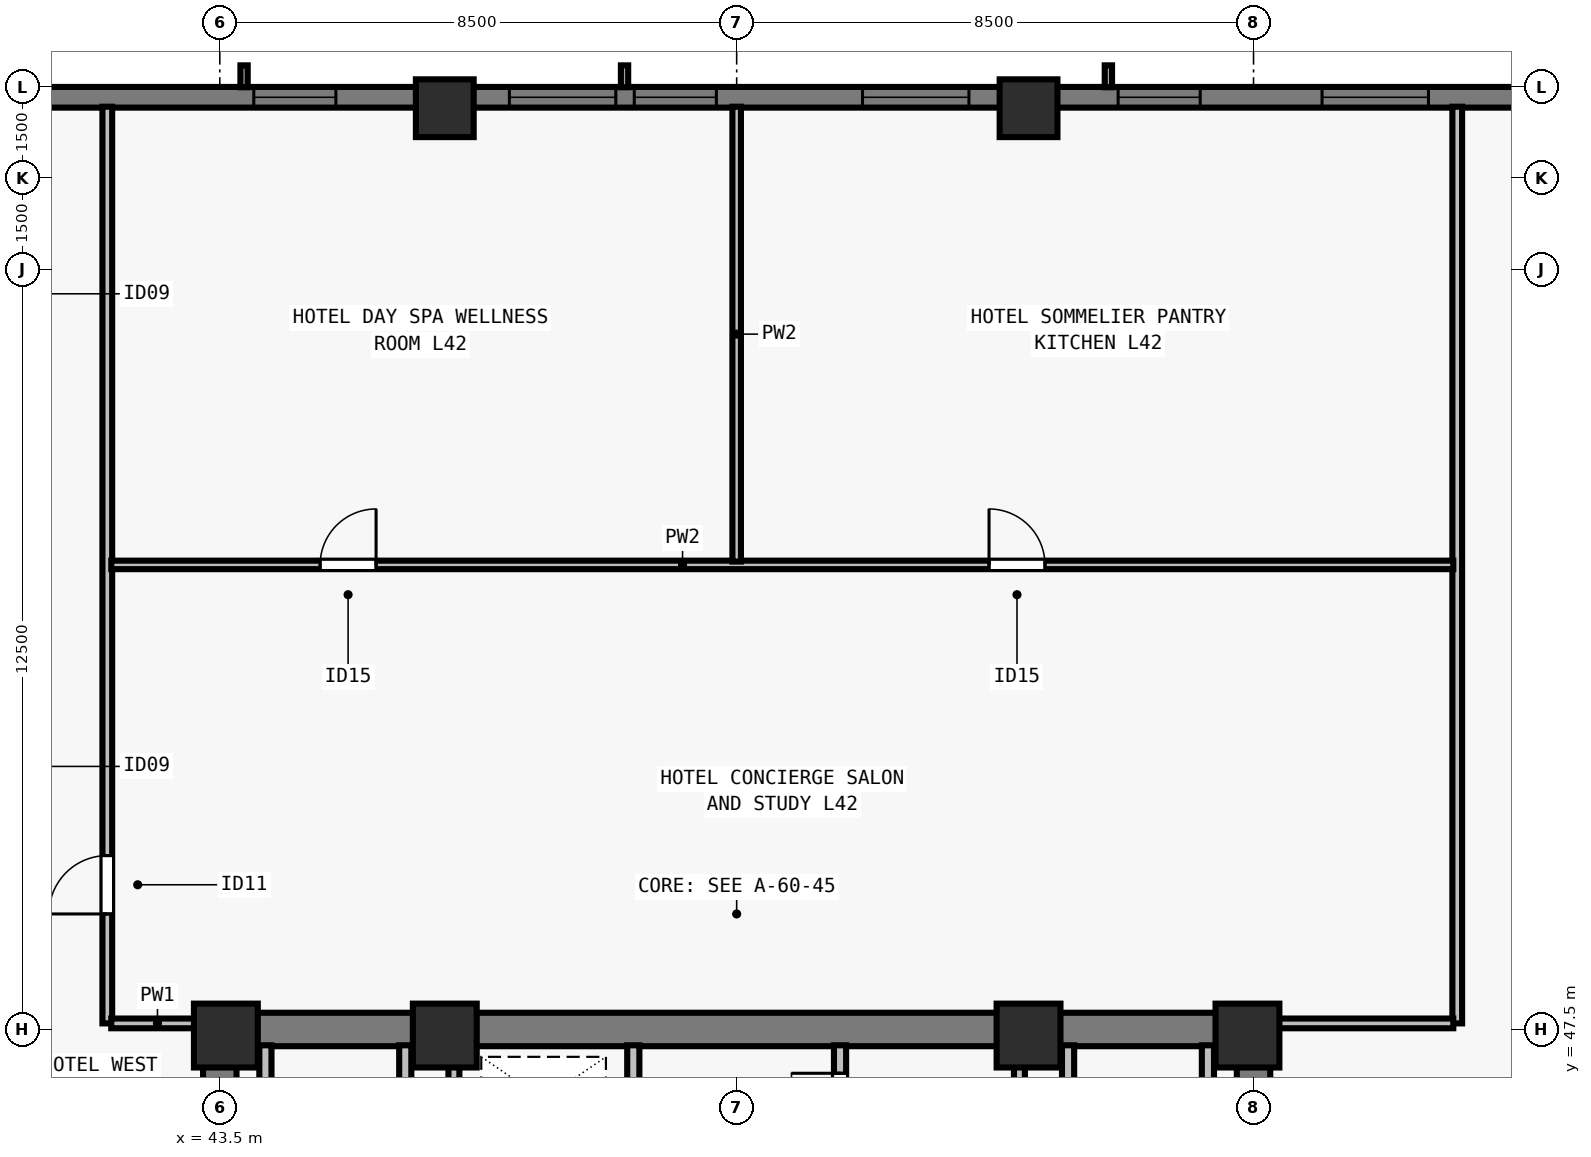
"""IFC4 building model, lengths in metres.
Left out: names, types, materials, properties, quantities, classifications, styles, units other than length and angle.
Written with IfcOpenShell. Run it as: python <this file> out.ifc"""

import sys

from ifc_helpers import new_model, si_unit, direction, frame, frame_2d, origin, origin_2d, place, context, subcontext, project, spatial, rectangle, extrude, element, fill, save


model = new_model("IFC4")
c1 = context("Model", 3, precision=1e-05, world=origin(), true_north=direction((0.0, 1.0)))
c2 = subcontext(c1, "Body", "Model", "MODEL_VIEW")
j1 = project(units=[si_unit("LENGTHUNIT", "METRE"), si_unit("PLANEANGLEUNIT", "RADIAN")], contexts=[c1])
p1 = place(None, origin())
s1 = spatial("IfcSite", under=j1, at=p1, CompositionType="ELEMENT")
p2 = place(p1, origin())
s2 = spatial("IfcBuilding", under=s1, at=p2, CompositionType="ELEMENT")
p3 = place(p2, frame((0.0, 0.0, 155.0)))
s3 = spatial("IfcBuildingStorey", under=s2, at=p3, CompositionType="ELEMENT", Elevation=155.0)
for number, where, z_axis, x_axis in (
    (1, (43.6, 47.4, 0.0), (0.0, 0.0, 1.0), (1.0, 0.0, 0.0)),
    (2, (47.2, 47.4, 0.0), (0.0, 0.0, 1.0), (1.0, 0.0, 0.0)),
    (3, (56.8, 47.4, 0.0), (0.0, 0.0, 1.0), (1.0, 0.0, 0.0)),
    (4, (60.4, 47.4, 0.0), (0.0, 0.0, 1.0), (1.0, 0.0, 0.0)),
):
    element("IfcColumn", number, at=place(p3, frame(where, z_axis=z_axis, x_axis=x_axis)), inside=s3, PredefinedType="COLUMN", context=c2, shape_type="SweptSolid", body=[
        extrude(rectangle(XDim=1.05, YDim=1.05, at=origin_2d()), origin(), (0.0, 0.0, 1.0), 3.5),
    ])
for number, where, z_axis, x_axis in (
    (5, (56.8, 62.65, 0.0), (0.0, 0.0, 1.0), (1.0, 0.0, 0.0)),
    (6, (47.2, 62.65, 0.0), (0.0, 0.0, 1.0), (1.0, 0.0, 0.0)),
):
    element("IfcColumn", number, at=place(p3, frame(where, z_axis=z_axis, x_axis=x_axis)), inside=s3, PredefinedType="COLUMN", context=c2, shape_type="SweptSolid", body=[
        extrude(rectangle(XDim=0.95, YDim=0.95, at=origin_2d()), origin(), (0.0, 0.0, 1.0), 3.5),
    ])
p4 = place(p3, frame((32.0, 62.83, 0.0), z_axis=(0.0, 0.0, 1.0), x_axis=(1.0, 0.0, 0.0)))
e7 = element("IfcWall", 7, at=p4, inside=s3, PredefinedType="SOLIDWALL", context=c2, shape_type="SweptSolid", body=[
    extrude(rectangle(XDim=39.682, YDim=0.34, at=frame_2d((19.841, 0.0))), origin(), (0.0, 0.0, 1.0), 3.28),
])
p5 = place(p4, frame((4.952, 0.0, 0.8)))
e8 = element("IfcOpeningElement", 8, at=p5, cuts=e7, PredefinedType="OPENING", context=c2, shape_type="SweptSolid", body=[
    extrude(rectangle(XDim=1.35, YDim=1.66, at=frame_2d((0.675, 0.83))), frame((0.0, 0.18, 0.0), z_axis=(0.0, -1.0, 0.0), x_axis=(1.0, 0.0, 0.0)), (0.0, 0.0, 1.0), 0.36),
])
p6 = place(p4, frame((12.059, 0.0, 0.8)))
e9 = element("IfcOpeningElement", 9, at=p6, cuts=e7, PredefinedType="OPENING", context=c2, shape_type="SweptSolid", body=[
    extrude(rectangle(XDim=1.35, YDim=1.66, at=frame_2d((0.675, 0.83))), frame((0.0, 0.18, 0.0), z_axis=(0.0, -1.0, 0.0), x_axis=(1.0, 0.0, 0.0)), (0.0, 0.0, 1.0), 0.36),
])
p7 = place(p4, frame((16.262, 0.0, 0.8)))
e10 = element("IfcOpeningElement", 10, at=p7, cuts=e7, PredefinedType="OPENING", context=c2, shape_type="SweptSolid", body=[
    extrude(rectangle(XDim=1.75, YDim=1.66, at=frame_2d((0.875, 0.83))), frame((0.0, 0.18, 0.0), z_axis=(0.0, -1.0, 0.0), x_axis=(1.0, 0.0, 0.0)), (0.0, 0.0, 1.0), 0.36),
])
p8 = place(p4, frame((18.316, 0.0, 0.8)))
e11 = element("IfcOpeningElement", 11, at=p8, cuts=e7, PredefinedType="OPENING", context=c2, shape_type="SweptSolid", body=[
    extrude(rectangle(XDim=1.35, YDim=1.66, at=frame_2d((0.675, 0.83))), frame((0.0, 0.18, 0.0), z_axis=(0.0, -1.0, 0.0), x_axis=(1.0, 0.0, 0.0)), (0.0, 0.0, 1.0), 0.36),
])
p9 = place(p4, frame((22.07, 0.0, 0.8)))
e12 = element("IfcOpeningElement", 12, at=p9, cuts=e7, PredefinedType="OPENING", context=c2, shape_type="SweptSolid", body=[
    extrude(rectangle(XDim=1.75, YDim=1.66, at=frame_2d((0.875, 0.83))), frame((0.0, 0.18, 0.0), z_axis=(0.0, -1.0, 0.0), x_axis=(1.0, 0.0, 0.0)), (0.0, 0.0, 1.0), 0.36),
])
p10 = place(p4, frame((26.273, 0.0, 0.8)))
e13 = element("IfcOpeningElement", 13, at=p10, cuts=e7, PredefinedType="OPENING", context=c2, shape_type="SweptSolid", body=[
    extrude(rectangle(XDim=1.35, YDim=1.66, at=frame_2d((0.675, 0.83))), frame((0.0, 0.18, 0.0), z_axis=(0.0, -1.0, 0.0), x_axis=(1.0, 0.0, 0.0)), (0.0, 0.0, 1.0), 0.36),
])
p11 = place(p4, frame((29.627, 0.0, 0.8)))
e14 = element("IfcOpeningElement", 14, at=p11, cuts=e7, PredefinedType="OPENING", context=c2, shape_type="SweptSolid", body=[
    extrude(rectangle(XDim=1.75, YDim=1.66, at=frame_2d((0.875, 0.83))), frame((0.0, 0.18, 0.0), z_axis=(0.0, -1.0, 0.0), x_axis=(1.0, 0.0, 0.0)), (0.0, 0.0, 1.0), 0.36),
])
p12 = place(p3, frame((43.225, 47.5, 0.0), z_axis=(0.0, 0.0, 1.0), x_axis=(1.0, 0.0, 0.0)))
e15 = element("IfcWall", 15, at=p12, inside=s3, PredefinedType="SHEAR", context=c2, shape_type="SweptSolid", body=[
    extrude(rectangle(XDim=17.55, YDim=0.55, at=frame_2d((8.775, 0.0))), origin(), (0.0, 0.0, 1.0), 3.28),
])
for number, where, z_axis, x_axis in (
    (16, (43.5, 40.8, 0.0), (0.0, 0.0, 1.0), (0.0, 1.0, 0.0)),
    (17, (60.5, 40.8, 0.0), (0.0, 0.0, 1.0), (0.0, 1.0, 0.0)),
):
    element("IfcWall", number, at=place(p3, frame(where, z_axis=z_axis, x_axis=x_axis)), inside=s3, PredefinedType="SHEAR", context=c2, shape_type="SweptSolid", body=[
        extrude(rectangle(XDim=6.435, YDim=0.55, at=frame_2d((3.218, 0.0))), origin(), (0.0, 0.0, 1.0), 3.28),
    ])
p13 = place(p3, frame((50.3, 40.585, 0.0), z_axis=(0.0, 0.0, 1.0), x_axis=(0.0, 1.0, 0.0)))
e18 = element("IfcWall", 18, at=p13, inside=s3, PredefinedType="SOLIDWALL", context=c2, shape_type="SweptSolid", body=[
    extrude(rectangle(XDim=6.655, YDim=0.2, at=frame_2d((3.328, 0.0))), origin(), (0.0, 0.0, 1.0), 3.28),
])
p14 = place(p13, frame((5.065, 0.0, 0.0)))
e19 = element("IfcOpeningElement", 19, at=p14, cuts=e18, PredefinedType="OPENING", context=c2, shape_type="SweptSolid", body=[
    extrude(rectangle(XDim=0.8, YDim=2.08, at=frame_2d((0.4, 1.04))), frame((0.0, 0.11, 0.0), z_axis=(0.0, -1.0, 0.0), x_axis=(1.0, 0.0, 0.0)), (0.0, 0.0, 1.0), 0.22),
])
p15 = place(p3, frame((53.7, 40.585, 0.0), z_axis=(0.0, 0.0, 1.0), x_axis=(0.0, 1.0, 0.0)))
e20 = element("IfcWall", 20, at=p15, inside=s3, PredefinedType="SOLIDWALL", context=c2, shape_type="SweptSolid", body=[
    extrude(rectangle(XDim=6.655, YDim=0.2, at=frame_2d((3.328, 0.0))), origin(), (0.0, 0.0, 1.0), 3.28),
])
p16 = place(p15, frame((0.195, 0.0, 0.0)))
e21 = element("IfcOpeningElement", 21, at=p16, cuts=e20, PredefinedType="OPENING", context=c2, shape_type="SweptSolid", body=[
    extrude(rectangle(XDim=0.8, YDim=2.08, at=frame_2d((0.4, 1.04))), frame((0.0, 0.11, 0.0), z_axis=(0.0, -1.0, 0.0), x_axis=(1.0, 0.0, 0.0)), (0.0, 0.0, 1.0), 0.22),
])
p17 = place(p15, frame((3.735, 0.0, 0.0)))
e22 = element("IfcOpeningElement", 22, at=p17, cuts=e20, PredefinedType="OPENING", context=c2, shape_type="SweptSolid", body=[
    extrude(rectangle(XDim=0.9, YDim=2.12, at=frame_2d((0.45, 1.06))), frame((0.0, 0.11, 0.0), z_axis=(0.0, -1.0, 0.0), x_axis=(1.0, 0.0, 0.0)), (0.0, 0.0, 1.0), 0.22),
])
p18 = place(p15, frame((5.395, 0.0, 0.0)))
e23 = element("IfcOpeningElement", 23, at=p18, cuts=e20, PredefinedType="OPENING", context=c2, shape_type="SweptSolid", body=[
    extrude(rectangle(XDim=0.8, YDim=2.1, at=frame_2d((0.4, 1.05))), frame((0.0, 0.11, 0.0), z_axis=(0.0, -1.0, 0.0), x_axis=(1.0, 0.0, 0.0)), (0.0, 0.0, 1.0), 0.22),
])
for number, where, z_axis, x_axis in (
    (24, (46.55, 43.735, 0.0), (0.0, 0.0, 1.0), (0.0, 1.0, 0.0)),
    (25, (44.25, 43.735, 0.0), (0.0, 0.0, 1.0), (0.0, 1.0, 0.0)),
    (26, (57.45, 43.735, 0.0), (0.0, 0.0, 1.0), (0.0, 1.0, 0.0)),
    (27, (59.75, 43.735, 0.0), (0.0, 0.0, 1.0), (0.0, 1.0, 0.0)),
):
    element("IfcWall", number, at=place(p3, frame(where, z_axis=z_axis, x_axis=x_axis)), inside=s3, PredefinedType="SOLIDWALL", context=c2, shape_type="SweptSolid", body=[
        extrude(rectangle(XDim=3.505, YDim=0.2, at=frame_2d((1.752, 0.0))), origin(), (0.0, 0.0, 1.0), 3.28),
    ])
for number, where, z_axis, x_axis in (
    (28, (47.35, 43.735, 0.0), (0.0, 0.0, 1.0), (0.0, 1.0, 0.0)),
    (29, (56.65, 43.735, 0.0), (0.0, 0.0, 1.0), (0.0, 1.0, 0.0)),
):
    element("IfcWall", number, at=place(p3, frame(where, z_axis=z_axis, x_axis=x_axis)), inside=s3, PredefinedType="SOLIDWALL", context=c2, shape_type="SweptSolid", body=[
        extrude(rectangle(XDim=3.505, YDim=0.18, at=frame_2d((1.752, 0.0))), origin(), (0.0, 0.0, 1.0), 3.28),
    ])
p19 = place(p3, frame((41.65, 47.6, 0.0), z_axis=(0.0, 0.0, 1.0), x_axis=(0.0, 1.0, 0.0)))
e30 = element("IfcWall", 30, at=p19, inside=s3, PredefinedType="PARTITIONING", context=c2, shape_type="SweptSolid", body=[
    extrude(rectangle(XDim=15.075, YDim=0.16, at=frame_2d((7.538, 0.0))), origin(), (0.0, 0.0, 1.0), 2.555),
])
p20 = place(p19, frame((1.8, 0.0, 0.0)))
e31 = element("IfcOpeningElement", 31, at=p20, cuts=e30, PredefinedType="OPENING", context=c2, shape_type="SweptSolid", body=[
    extrude(rectangle(XDim=0.96, YDim=2.12, at=frame_2d((0.48, 1.06))), frame((0.0, 0.09, 0.0), z_axis=(0.0, -1.0, 0.0), x_axis=(1.0, 0.0, 0.0)), (0.0, 0.0, 1.0), 0.18),
])
p21 = place(p3, frame((41.715, 47.6, 0.0), z_axis=(0.0, 0.0, 1.0), x_axis=(1.0, 0.0, 0.0)))
e32 = element("IfcWall", 32, at=p21, inside=s3, PredefinedType="PARTITIONING", context=c2, shape_type="SweptSolid", body=[
    extrude(rectangle(XDim=1.52, YDim=0.16, at=frame_2d((0.76, 0.0))), origin(), (0.0, 0.0, 1.0), 3.28),
])
p22 = place(p3, frame((63.85, 47.6, 0.0), z_axis=(0.0, 0.0, 1.0), x_axis=(0.0, 1.0, 0.0)))
e33 = element("IfcWall", 33, at=p22, inside=s3, PredefinedType="PARTITIONING", context=c2, shape_type="SweptSolid", body=[
    extrude(rectangle(XDim=15.075, YDim=0.16, at=frame_2d((7.538, 0.0))), origin(), (0.0, 0.0, 1.0), 2.555),
])
p23 = place(p3, frame((60.765, 47.6, 0.0), z_axis=(0.0, 0.0, 1.0), x_axis=(1.0, 0.0, 0.0)))
e34 = element("IfcWall", 34, at=p23, inside=s3, PredefinedType="PARTITIONING", context=c2, shape_type="SweptSolid", body=[
    extrude(rectangle(XDim=3.02, YDim=0.16, at=frame_2d((1.51, 0.0))), origin(), (0.0, 0.0, 1.0), 3.28),
])
p24 = place(p3, frame((41.715, 55.14, 0.0), z_axis=(0.0, 0.0, 1.0), x_axis=(1.0, 0.0, 0.0)))
e35 = element("IfcWall", 35, at=p24, inside=s3, PredefinedType="PARTITIONING", context=c2, shape_type="SweptSolid", body=[
    extrude(rectangle(XDim=22.07, YDim=0.14, at=frame_2d((11.035, 0.0))), origin(), (0.0, 0.0, 1.0), 3.28),
])
p25 = place(p24, frame((3.435, 0.0, 0.0)))
e36 = element("IfcOpeningElement", 36, at=p25, cuts=e35, PredefinedType="OPENING", context=c2, shape_type="SweptSolid", body=[
    extrude(rectangle(XDim=0.92, YDim=2.12, at=frame_2d((0.46, 1.06))), frame((0.0, 0.08, 0.0), z_axis=(0.0, -1.0, 0.0), x_axis=(1.0, 0.0, 0.0)), (0.0, 0.0, 1.0), 0.16),
])
p26 = place(p24, frame((14.435, 0.0, 0.0)))
e37 = element("IfcOpeningElement", 37, at=p26, cuts=e35, PredefinedType="OPENING", context=c2, shape_type="SweptSolid", body=[
    extrude(rectangle(XDim=0.92, YDim=2.12, at=frame_2d((0.46, 1.06))), frame((0.0, 0.08, 0.0), z_axis=(0.0, -1.0, 0.0), x_axis=(1.0, 0.0, 0.0)), (0.0, 0.0, 1.0), 0.16),
])
p27 = place(p3, frame((52.0, 55.195, 0.0), z_axis=(0.0, 0.0, 1.0), x_axis=(0.0, 1.0, 0.0)))
e38 = element("IfcWall", 38, at=p27, inside=s3, PredefinedType="PARTITIONING", context=c2, shape_type="SweptSolid", body=[
    extrude(rectangle(XDim=7.48, YDim=0.14, at=frame_2d((3.74, 0.0))), origin(), (0.0, 0.0, 1.0), 3.28),
])
p28 = place(p6, origin())
e39 = element("IfcWindow", 39, at=p28, inside=s3, PartitioningType="SINGLE_PANEL", PredefinedType="WINDOW", context=c2, shape_type="SweptSolid", body=[
    extrude(rectangle(XDim=1.35, YDim=1.66, at=frame_2d((0.675, 0.83))), frame((0.0, -0.05, 0.0), z_axis=(0.0, -1.0, 0.0), x_axis=(1.0, 0.0, 0.0)), (0.0, 0.0, 1.0), 0.06),
])
fill(e9, e39)
p29 = place(p7, origin())
e40 = element("IfcWindow", 40, at=p29, inside=s3, PartitioningType="SINGLE_PANEL", PredefinedType="WINDOW", context=c2, shape_type="SweptSolid", body=[
    extrude(rectangle(XDim=1.75, YDim=1.66, at=frame_2d((0.875, 0.83))), frame((0.0, -0.05, 0.0), z_axis=(0.0, -1.0, 0.0), x_axis=(1.0, 0.0, 0.0)), (0.0, 0.0, 1.0), 0.06),
])
fill(e10, e40)
p30 = place(p8, origin())
e41 = element("IfcWindow", 41, at=p30, inside=s3, PartitioningType="SINGLE_PANEL", PredefinedType="WINDOW", context=c2, shape_type="SweptSolid", body=[
    extrude(rectangle(XDim=1.35, YDim=1.66, at=frame_2d((0.675, 0.83))), frame((0.0, -0.05, 0.0), z_axis=(0.0, -1.0, 0.0), x_axis=(1.0, 0.0, 0.0)), (0.0, 0.0, 1.0), 0.06),
])
fill(e11, e41)
p31 = place(p9, origin())
e42 = element("IfcWindow", 42, at=p31, inside=s3, PartitioningType="SINGLE_PANEL", PredefinedType="WINDOW", context=c2, shape_type="SweptSolid", body=[
    extrude(rectangle(XDim=1.75, YDim=1.66, at=frame_2d((0.875, 0.83))), frame((0.0, -0.05, 0.0), z_axis=(0.0, -1.0, 0.0), x_axis=(1.0, 0.0, 0.0)), (0.0, 0.0, 1.0), 0.06),
])
fill(e12, e42)
p32 = place(p10, origin())
e43 = element("IfcWindow", 43, at=p32, inside=s3, PartitioningType="SINGLE_PANEL", PredefinedType="WINDOW", context=c2, shape_type="SweptSolid", body=[
    extrude(rectangle(XDim=1.35, YDim=1.66, at=frame_2d((0.675, 0.83))), frame((0.0, -0.05, 0.0), z_axis=(0.0, -1.0, 0.0), x_axis=(1.0, 0.0, 0.0)), (0.0, 0.0, 1.0), 0.06),
])
fill(e13, e43)
p33 = place(p11, origin())
e44 = element("IfcWindow", 44, at=p33, inside=s3, PartitioningType="SINGLE_PANEL", PredefinedType="WINDOW", context=c2, shape_type="SweptSolid", body=[
    extrude(rectangle(XDim=1.75, YDim=1.66, at=frame_2d((0.875, 0.83))), frame((0.0, -0.05, 0.0), z_axis=(0.0, -1.0, 0.0), x_axis=(1.0, 0.0, 0.0)), (0.0, 0.0, 1.0), 0.06),
])
fill(e14, e44)
p34 = place(p18, origin())
e45 = element("IfcDoor", 45, at=p34, inside=s3, OperationType="SINGLE_SWING_RIGHT", PredefinedType="DOOR", context=c2, shape_type="SweptSolid", body=[
    extrude(rectangle(XDim=0.8, YDim=2.1, at=frame_2d((0.4, 1.05))), frame((0.0, 0.025, 0.0), z_axis=(0.0, -1.0, 0.0), x_axis=(1.0, 0.0, 0.0)), (0.0, 0.0, 1.0), 0.05),
])
fill(e23, e45)
p35 = place(p20, origin())
e46 = element("IfcDoor", 46, at=p35, inside=s3, OperationType="SINGLE_SWING_LEFT", PredefinedType="DOOR", context=c2, shape_type="SweptSolid", body=[
    extrude(rectangle(XDim=0.96, YDim=2.12, at=frame_2d((0.48, 1.06))), frame((0.0, 0.025, 0.0), z_axis=(0.0, -1.0, 0.0), x_axis=(1.0, 0.0, 0.0)), (0.0, 0.0, 1.0), 0.05),
])
fill(e31, e46)
p36 = place(p25, origin())
e47 = element("IfcDoor", 47, at=p36, inside=s3, OperationType="SINGLE_SWING_RIGHT", PredefinedType="DOOR", context=c2, shape_type="SweptSolid", body=[
    extrude(rectangle(XDim=0.92, YDim=2.12, at=frame_2d((0.46, 1.06))), frame((0.0, 0.025, 0.0), z_axis=(0.0, -1.0, 0.0), x_axis=(1.0, 0.0, 0.0)), (0.0, 0.0, 1.0), 0.05),
])
fill(e36, e47)
p37 = place(p26, origin())
e48 = element("IfcDoor", 48, at=p37, inside=s3, OperationType="SINGLE_SWING_LEFT", PredefinedType="DOOR", context=c2, shape_type="SweptSolid", body=[
    extrude(rectangle(XDim=0.92, YDim=2.12, at=frame_2d((0.46, 1.06))), frame((0.0, 0.025, 0.0), z_axis=(0.0, -1.0, 0.0), x_axis=(1.0, 0.0, 0.0)), (0.0, 0.0, 1.0), 0.05),
])
fill(e37, e48)
save(model, sys.argv[1])
